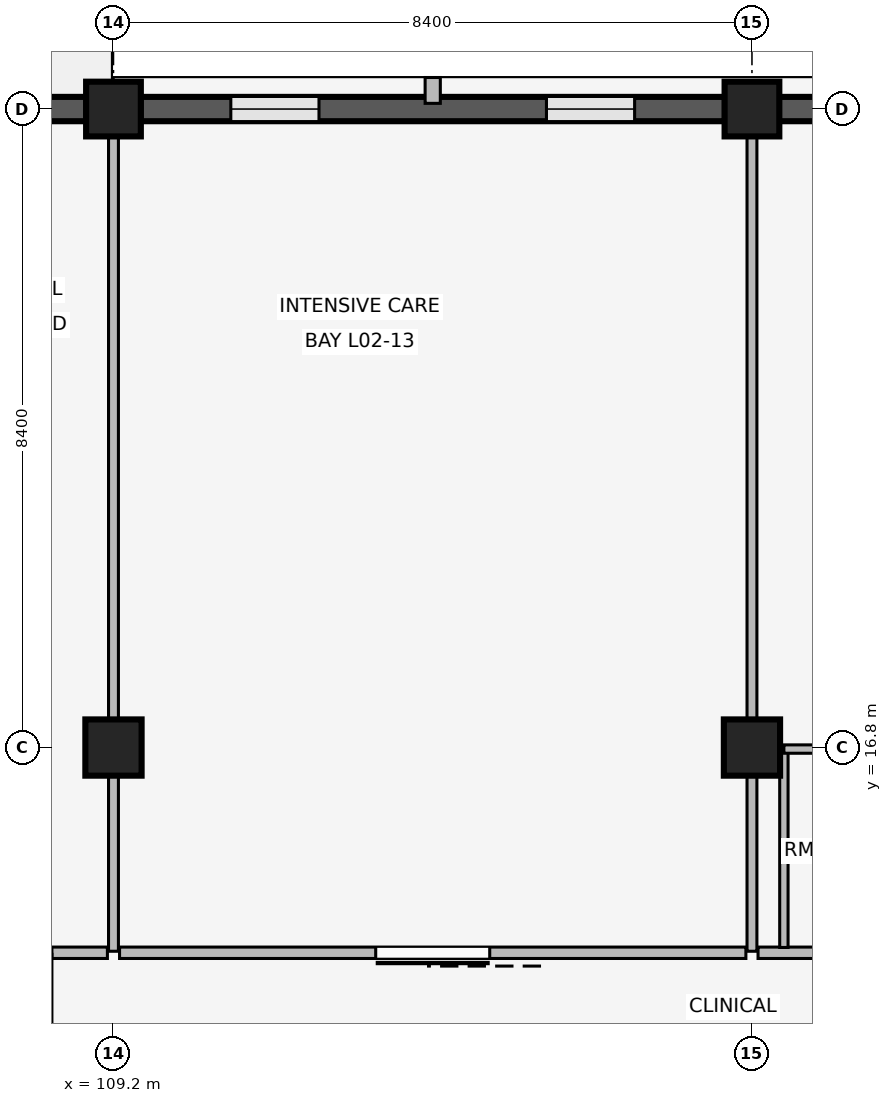
"""IFC4 building model, lengths in metres.
Left out: names, types, materials, properties, quantities, classifications, styles, units other than length and angle.
Written with IfcOpenShell. Run it as: python <this file> out.ifc"""

import sys

from ifc_helpers import new_model, si_unit, direction, frame, frame_2d, origin, origin_2d, place, context, subcontext, project, spatial, rectangle, extrude, element, fill, save


model = new_model("IFC4")
c1 = context("Model", 3, precision=1e-05, world=origin(), true_north=direction((0.0, 1.0)))
c2 = subcontext(c1, "Body", "Model", "MODEL_VIEW")
j1 = project(units=[si_unit("LENGTHUNIT", "METRE"), si_unit("PLANEANGLEUNIT", "RADIAN")], contexts=[c1])
p1 = place(None, origin())
s1 = spatial("IfcSite", under=j1, at=p1, CompositionType="ELEMENT")
p2 = place(p1, origin())
s2 = spatial("IfcBuilding", under=s1, at=p2, CompositionType="ELEMENT")
p3 = place(p2, frame((0.0, 0.0, 8.1)))
s3 = spatial("IfcBuildingStorey", under=s2, at=p3, CompositionType="ELEMENT", Elevation=8.1)
p4 = place(p3, frame((109.2, 16.8, 0.0), z_axis=(0.0, 0.0, 1.0), x_axis=(1.0, 0.0, 0.0)))
e1 = element("IfcColumn", 1, at=p4, inside=s3, PredefinedType="COLUMN", context=c2, shape_type="SweptSolid", body=[
    extrude(rectangle(XDim=0.74, YDim=0.74, at=origin_2d()), origin(), (0.0, 0.0, 1.0), 4.8),
])
p5 = place(p3, frame((109.2, 25.2, 0.0), z_axis=(0.0, 0.0, 1.0), x_axis=(1.0, 0.0, 0.0)))
e2 = element("IfcColumn", 2, at=p5, inside=s3, PredefinedType="COLUMN", context=c2, shape_type="SweptSolid", body=[
    extrude(rectangle(XDim=0.72, YDim=0.72, at=origin_2d()), origin(), (0.0, 0.0, 1.0), 4.8),
])
p6 = place(p3, frame((117.6, 16.8, 0.0), z_axis=(0.0, 0.0, 1.0), x_axis=(1.0, 0.0, 0.0)))
e3 = element("IfcColumn", 3, at=p6, inside=s3, PredefinedType="COLUMN", context=c2, shape_type="SweptSolid", body=[
    extrude(rectangle(XDim=0.74, YDim=0.74, at=origin_2d()), origin(), (0.0, 0.0, 1.0), 4.8),
])
p7 = place(p3, frame((117.6, 25.2, 0.0), z_axis=(0.0, 0.0, 1.0), x_axis=(1.0, 0.0, 0.0)))
e4 = element("IfcColumn", 4, at=p7, inside=s3, PredefinedType="COLUMN", context=c2, shape_type="SweptSolid", body=[
    extrude(rectangle(XDim=0.72, YDim=0.72, at=origin_2d()), origin(), (0.0, 0.0, 1.0), 4.8),
])
p8 = place(p3, frame((101.155, 25.2, 0.0), z_axis=(0.0, 0.0, 1.0), x_axis=(1.0, 0.0, 0.0)))
e5 = element("IfcWall", 5, at=p8, inside=s3, PredefinedType="SOLIDWALL", context=c2, shape_type="SweptSolid", body=[
    extrude(rectangle(XDim=7.69, YDim=0.32, at=frame_2d((3.845, 0.0))), origin(), (0.0, 0.0, 1.0), 3.86),
])
p9 = place(p8, frame((1.139, 0.0, 0.85)))
e6 = element("IfcOpeningElement", 6, at=p9, cuts=e5, PredefinedType="OPENING", context=c2, shape_type="SweptSolid", body=[
    extrude(rectangle(XDim=1.26, YDim=1.52, at=frame_2d((0.63, 0.76))), frame((0.0, 0.17, 0.0), z_axis=(0.0, -1.0, 0.0), x_axis=(1.0, 0.0, 0.0)), (0.0, 0.0, 1.0), 0.34),
])
p10 = place(p8, frame((5.291, 0.0, 0.85)))
e7 = element("IfcOpeningElement", 7, at=p10, cuts=e5, PredefinedType="OPENING", context=c2, shape_type="SweptSolid", body=[
    extrude(rectangle(XDim=1.26, YDim=1.52, at=frame_2d((0.63, 0.76))), frame((0.0, 0.17, 0.0), z_axis=(0.0, -1.0, 0.0), x_axis=(1.0, 0.0, 0.0)), (0.0, 0.0, 1.0), 0.34),
])
p11 = place(p3, frame((109.555, 25.2, 0.0), z_axis=(0.0, 0.0, 1.0), x_axis=(1.0, 0.0, 0.0)))
e8 = element("IfcWall", 8, at=p11, inside=s3, PredefinedType="SOLIDWALL", context=c2, shape_type="SweptSolid", body=[
    extrude(rectangle(XDim=7.69, YDim=0.32, at=frame_2d((3.845, 0.0))), origin(), (0.0, 0.0, 1.0), 3.86),
])
p12 = place(p11, frame((1.189, 0.0, 0.85)))
e9 = element("IfcOpeningElement", 9, at=p12, cuts=e8, PredefinedType="OPENING", context=c2, shape_type="SweptSolid", body=[
    extrude(rectangle(XDim=1.16, YDim=1.48, at=frame_2d((0.58, 0.74))), frame((0.0, 0.17, 0.0), z_axis=(0.0, -1.0, 0.0), x_axis=(1.0, 0.0, 0.0)), (0.0, 0.0, 1.0), 0.34),
])
p13 = place(p11, frame((5.341, 0.0, 0.85)))
e10 = element("IfcOpeningElement", 10, at=p13, cuts=e8, PredefinedType="OPENING", context=c2, shape_type="SweptSolid", body=[
    extrude(rectangle(XDim=1.16, YDim=1.48, at=frame_2d((0.58, 0.74))), frame((0.0, 0.17, 0.0), z_axis=(0.0, -1.0, 0.0), x_axis=(1.0, 0.0, 0.0)), (0.0, 0.0, 1.0), 0.34),
])
p14 = place(p3, frame((113.4, 25.275, 0.0), z_axis=(0.0, 0.0, 1.0), x_axis=(0.0, 1.0, 0.0)))
e11 = element("IfcWall", 11, at=p14, inside=s3, PredefinedType="ELEMENTEDWALL", context=c2, shape_type="SweptSolid", body=[
    extrude(rectangle(XDim=0.34, YDim=0.2, at=frame_2d((0.17, 0.0))), origin(), (0.0, 0.0, 1.0), 3.84),
])
p15 = place(p3, frame((117.955, 25.2, 0.0), z_axis=(0.0, 0.0, 1.0), x_axis=(1.0, 0.0, 0.0)))
e12 = element("IfcWall", 12, at=p15, inside=s3, PredefinedType="SOLIDWALL", context=c2, shape_type="SweptSolid", body=[
    extrude(rectangle(XDim=7.69, YDim=0.32, at=frame_2d((3.845, 0.0))), origin(), (0.0, 0.0, 1.0), 3.86),
])
p16 = place(p15, frame((1.069, 0.0, 0.85)))
e13 = element("IfcOpeningElement", 13, at=p16, cuts=e12, PredefinedType="OPENING", context=c2, shape_type="SweptSolid", body=[
    extrude(rectangle(XDim=1.4, YDim=1.4, at=frame_2d((0.7, 0.7))), frame((0.0, 0.17, 0.0), z_axis=(0.0, -1.0, 0.0), x_axis=(1.0, 0.0, 0.0)), (0.0, 0.0, 1.0), 0.34),
])
p17 = place(p15, frame((5.221, 0.0, 0.85)))
e14 = element("IfcOpeningElement", 14, at=p17, cuts=e12, PredefinedType="OPENING", context=c2, shape_type="SweptSolid", body=[
    extrude(rectangle(XDim=1.4, YDim=1.4, at=frame_2d((0.7, 0.7))), frame((0.0, 0.17, 0.0), z_axis=(0.0, -1.0, 0.0), x_axis=(1.0, 0.0, 0.0)), (0.0, 0.0, 1.0), 0.34),
])
p18 = place(p3, frame((109.12, 14.1, 0.0), z_axis=(0.0, 0.0, 1.0), x_axis=(-1.0, 0.0, 0.0)))
e15 = element("IfcWall", 15, at=p18, inside=s3, PredefinedType="PARTITIONING", context=c2, shape_type="SweptSolid", body=[
    extrude(rectangle(XDim=7.96, YDim=0.15, at=frame_2d((3.98, 0.0))), origin(), (0.0, 0.0, 1.0), 3.84),
])
p19 = place(p18, frame((0.73, 0.0, 0.0)))
e16 = element("IfcOpeningElement", 16, at=p19, cuts=e15, PredefinedType="OPENING", context=c2, shape_type="SweptSolid", body=[
    extrude(rectangle(XDim=1.3, YDim=2.25, at=frame_2d((0.65, 1.125))), frame((0.0, 0.085, 0.0), z_axis=(0.0, -1.0, 0.0), x_axis=(1.0, 0.0, 0.0)), (0.0, 0.0, 1.0), 0.17),
])
p20 = place(p18, frame((4.43, 0.0, 0.0)))
e17 = element("IfcOpeningElement", 17, at=p20, cuts=e15, PredefinedType="OPENING", context=c2, shape_type="SweptSolid", body=[
    extrude(rectangle(XDim=1.3, YDim=2.25, at=frame_2d((0.65, 1.125))), frame((0.0, 0.085, 0.0), z_axis=(0.0, -1.0, 0.0), x_axis=(1.0, 0.0, 0.0)), (0.0, 0.0, 1.0), 0.17),
])
p21 = place(p3, frame((109.2, 14.12, 0.0), z_axis=(0.0, 0.0, 1.0), x_axis=(0.0, 1.0, 0.0)))
e18 = element("IfcWall", 18, at=p21, inside=s3, PredefinedType="PARTITIONING", context=c2, shape_type="SweptSolid", body=[
    extrude(rectangle(XDim=10.94, YDim=0.13, at=frame_2d((5.47, 0.0))), origin(), (0.0, 0.0, 1.0), 3.84),
])
p22 = place(p3, frame((117.52, 14.1, 0.0), z_axis=(0.0, 0.0, 1.0), x_axis=(-1.0, 0.0, 0.0)))
e19 = element("IfcWall", 19, at=p22, inside=s3, PredefinedType="PARTITIONING", context=c2, shape_type="SweptSolid", body=[
    extrude(rectangle(XDim=8.24, YDim=0.15, at=frame_2d((4.12, 0.0))), origin(), (0.0, 0.0, 1.0), 3.84),
])
p23 = place(p22, frame((3.37, 0.0, 0.0)))
e20 = element("IfcOpeningElement", 20, at=p23, cuts=e19, PredefinedType="OPENING", context=c2, shape_type="SweptSolid", body=[
    extrude(rectangle(XDim=1.5, YDim=2.3, at=frame_2d((0.75, 1.15))), frame((0.0, 0.085, 0.0), z_axis=(0.0, -1.0, 0.0), x_axis=(1.0, 0.0, 0.0)), (0.0, 0.0, 1.0), 0.17),
])
p24 = place(p3, frame((117.6, 14.12, 0.0), z_axis=(0.0, 0.0, 1.0), x_axis=(0.0, 1.0, 0.0)))
e21 = element("IfcWall", 21, at=p24, inside=s3, PredefinedType="PARTITIONING", context=c2, shape_type="SweptSolid", body=[
    extrude(rectangle(XDim=10.94, YDim=0.13, at=frame_2d((5.47, 0.0))), origin(), (0.0, 0.0, 1.0), 3.84),
])
p25 = place(p3, frame((125.92, 14.1, 0.0), z_axis=(0.0, 0.0, 1.0), x_axis=(-1.0, 0.0, 0.0)))
e22 = element("IfcWall", 22, at=p25, inside=s3, PredefinedType="PARTITIONING", context=c2, shape_type="SweptSolid", body=[
    extrude(rectangle(XDim=8.24, YDim=0.15, at=frame_2d((4.12, 0.0))), origin(), (0.0, 0.0, 1.0), 3.84),
])
p26 = place(p25, frame((0.73, 0.0, 0.0)))
e23 = element("IfcOpeningElement", 23, at=p26, cuts=e22, PredefinedType="OPENING", context=c2, shape_type="SweptSolid", body=[
    extrude(rectangle(XDim=1.3, YDim=2.25, at=frame_2d((0.65, 1.125))), frame((0.0, 0.085, 0.0), z_axis=(0.0, -1.0, 0.0), x_axis=(1.0, 0.0, 0.0)), (0.0, 0.0, 1.0), 0.17),
])
p27 = place(p25, frame((4.43, 0.0, 0.0)))
e24 = element("IfcOpeningElement", 24, at=p27, cuts=e22, PredefinedType="OPENING", context=c2, shape_type="SweptSolid", body=[
    extrude(rectangle(XDim=1.3, YDim=2.25, at=frame_2d((0.65, 1.125))), frame((0.0, 0.085, 0.0), z_axis=(0.0, -1.0, 0.0), x_axis=(1.0, 0.0, 0.0)), (0.0, 0.0, 1.0), 0.17),
])
p28 = place(p3, frame((118.02, 14.17, 0.0), z_axis=(0.0, 0.0, 1.0), x_axis=(0.0, 1.0, 0.0)))
e25 = element("IfcWall", 25, at=p28, inside=s3, PredefinedType="PARTITIONING", context=c2, shape_type="SweptSolid", body=[
    extrude(rectangle(XDim=2.61, YDim=0.11, at=frame_2d((1.305, 0.0))), origin(), (0.0, 0.0, 1.0), 3.84),
])
p29 = place(p3, frame((118.02, 16.78, 0.0), z_axis=(0.0, 0.0, 1.0), x_axis=(1.0, 0.0, 0.0)))
e26 = element("IfcWall", 26, at=p29, inside=s3, PredefinedType="PARTITIONING", context=c2, shape_type="SweptSolid", body=[
    extrude(rectangle(XDim=1.98, YDim=0.11, at=frame_2d((0.99, 0.0))), origin(), (0.0, 0.0, 1.0), 3.84),
])
p30 = place(p29, frame((0.54, 0.0, 0.0)))
e27 = element("IfcOpeningElement", 27, at=p30, cuts=e26, PredefinedType="OPENING", context=c2, shape_type="SweptSolid", body=[
    extrude(rectangle(XDim=0.9, YDim=2.1, at=frame_2d((0.45, 1.05))), frame((0.0, 0.065, 0.0), z_axis=(0.0, -1.0, 0.0), x_axis=(1.0, 0.0, 0.0)), (0.0, 0.0, 1.0), 0.13),
])
p31 = place(p12, origin())
e28 = element("IfcWindow", 28, at=p31, inside=s3, PartitioningType="SINGLE_PANEL", PredefinedType="WINDOW", context=c2, shape_type="SweptSolid", body=[
    extrude(rectangle(XDim=1.16, YDim=1.48, at=frame_2d((0.58, 0.74))), frame((0.0, 0.03, 0.0), z_axis=(0.0, -1.0, 0.0), x_axis=(1.0, 0.0, 0.0)), (0.0, 0.0, 1.0), 0.06),
])
fill(e9, e28)
p32 = place(p13, origin())
e29 = element("IfcWindow", 29, at=p32, inside=s3, PartitioningType="SINGLE_PANEL", PredefinedType="WINDOW", context=c2, shape_type="SweptSolid", body=[
    extrude(rectangle(XDim=1.16, YDim=1.48, at=frame_2d((0.58, 0.74))), frame((0.0, 0.03, 0.0), z_axis=(0.0, -1.0, 0.0), x_axis=(1.0, 0.0, 0.0)), (0.0, 0.0, 1.0), 0.06),
])
fill(e10, e29)
p33 = place(p23, origin())
e30 = element("IfcDoor", 30, at=p33, inside=s3, OperationType="SLIDING_TO_LEFT", PredefinedType="DOOR", context=c2, shape_type="SweptSolid", body=[
    extrude(rectangle(XDim=1.5, YDim=2.3, at=frame_2d((0.75, 1.15))), frame((0.0, 0.025, 0.0), z_axis=(0.0, -1.0, 0.0), x_axis=(1.0, 0.0, 0.0)), (0.0, 0.0, 1.0), 0.05),
])
fill(e20, e30)
save(model, sys.argv[1])
